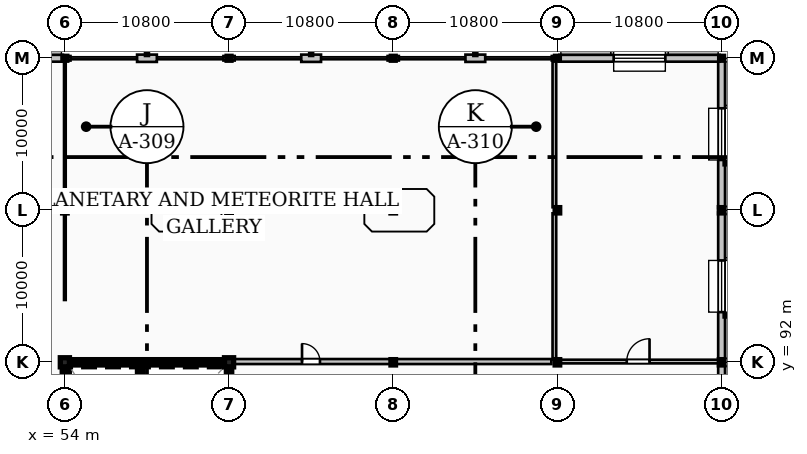
"""IFC4 building model, lengths in metres.
Left out: names, types, materials, properties, quantities, classifications, styles, units other than length and angle.
Written with IfcOpenShell. Run it as: python <this file> out.ifc"""

import sys

from ifc_helpers import new_model, si_unit, direction, frame, frame_2d, origin, origin_2d, place, context, subcontext, project, spatial, rectangle, hollow_rectangle, i_section, extrude, element, fill, save


model = new_model("IFC4")
c1 = context("Model", 3, precision=1e-05, world=origin(), true_north=direction((0.0, 1.0)))
c2 = subcontext(c1, "Body", "Model", "MODEL_VIEW")
j1 = project(units=[si_unit("LENGTHUNIT", "METRE"), si_unit("PLANEANGLEUNIT", "RADIAN")], contexts=[c1])
p1 = place(None, origin())
s1 = spatial("IfcSite", under=j1, at=p1, CompositionType="ELEMENT")
p2 = place(p1, origin())
s2 = spatial("IfcBuilding", under=s1, at=p2, CompositionType="ELEMENT")
p3 = place(p2, frame((0.0, 0.0, 14.4)))
s3 = spatial("IfcBuildingStorey", under=s2, at=p3, CompositionType="ELEMENT", Elevation=14.4)
p4 = place(p3, frame((54.0, 92.0, 0.0), z_axis=(0.0, 0.0, 1.0), x_axis=(1.0, 0.0, 0.0)))
e1 = element("IfcColumn", 1, at=p4, inside=s3, PredefinedType="COLUMN", context=c2, shape_type="SweptSolid", body=[
    extrude(rectangle(XDim=0.6, YDim=0.6, at=origin_2d()), origin(), (0.0, 0.0, 1.0), 9.6),
])
p5 = place(p3, frame((54.0, 102.0, 0.0), z_axis=(0.0, 0.0, 1.0), x_axis=(1.0, 0.0, 0.0)))
e2 = element("IfcColumn", 2, at=p5, inside=s3, PredefinedType="COLUMN", context=c2, shape_type="SweptSolid", body=[
    extrude(i_section(OverallWidth=0.3, OverallDepth=0.35, WebThickness=0.01, FlangeThickness=0.018, FilletRadius=0.027, at=origin_2d()), origin(), (0.0, 0.0, 1.0), 9.6),
])
p6 = place(p3, frame((54.0, 112.0, 0.0), z_axis=(0.0, 0.0, 1.0), x_axis=(1.0, 0.0, 0.0)))
e3 = element("IfcColumn", 3, at=p6, inside=s3, PredefinedType="COLUMN", context=c2, shape_type="SweptSolid", body=[
    extrude(hollow_rectangle(XDim=0.26, YDim=0.26, WallThickness=0.014, InnerFilletRadius=0.014, OuterFilletRadius=0.028, at=origin_2d()), origin(), (0.0, 0.0, 1.0), 9.6),
])
p7 = place(p3, frame((64.8, 92.0, 0.0), z_axis=(0.0, 0.0, 1.0), x_axis=(1.0, 0.0, 0.0)))
e4 = element("IfcColumn", 4, at=p7, inside=s3, PredefinedType="COLUMN", context=c2, shape_type="SweptSolid", body=[
    extrude(rectangle(XDim=0.6, YDim=0.6, at=origin_2d()), origin(), (0.0, 0.0, 1.0), 9.6),
])
p8 = place(p3, frame((64.8, 102.0, 0.0), z_axis=(0.0, 0.0, 1.0), x_axis=(1.0, 0.0, 0.0)))
e5 = element("IfcColumn", 5, at=p8, inside=s3, PredefinedType="COLUMN", context=c2, shape_type="SweptSolid", body=[
    extrude(i_section(OverallWidth=0.3, OverallDepth=0.35, WebThickness=0.01, FlangeThickness=0.018, FilletRadius=0.027, at=origin_2d()), origin(), (0.0, 0.0, 1.0), 9.6),
])
p9 = place(p3, frame((64.8, 112.0, 0.0), z_axis=(0.0, 0.0, 1.0), x_axis=(1.0, 0.0, 0.0)))
e6 = element("IfcColumn", 6, at=p9, inside=s3, PredefinedType="COLUMN", context=c2, shape_type="SweptSolid", body=[
    extrude(hollow_rectangle(XDim=0.26, YDim=0.26, WallThickness=0.014, InnerFilletRadius=0.014, OuterFilletRadius=0.028, at=origin_2d()), origin(), (0.0, 0.0, 1.0), 9.6),
])
for number, where, z_axis, x_axis in (
    (7, (75.6, 92.0, 0.0), (0.0, 0.0, 1.0), (1.0, 0.0, 0.0)),
    (8, (75.6, 102.0, 0.0), (0.0, 0.0, 1.0), (1.0, 0.0, 0.0)),
):
    element("IfcColumn", number, at=place(p3, frame(where, z_axis=z_axis, x_axis=x_axis)), inside=s3, PredefinedType="COLUMN", context=c2, shape_type="SweptSolid", body=[
        extrude(i_section(OverallWidth=0.3, OverallDepth=0.35, WebThickness=0.01, FlangeThickness=0.018, FilletRadius=0.027, at=origin_2d()), origin(), (0.0, 0.0, 1.0), 9.6),
    ])
p10 = place(p3, frame((75.6, 112.0, 0.0), z_axis=(0.0, 0.0, 1.0), x_axis=(1.0, 0.0, 0.0)))
e9 = element("IfcColumn", 9, at=p10, inside=s3, PredefinedType="COLUMN", context=c2, shape_type="SweptSolid", body=[
    extrude(hollow_rectangle(XDim=0.26, YDim=0.26, WallThickness=0.014, InnerFilletRadius=0.014, OuterFilletRadius=0.028, at=origin_2d()), origin(), (0.0, 0.0, 1.0), 9.6),
])
for number, where, z_axis, x_axis in (
    (10, (86.4, 92.0, 0.0), (0.0, 0.0, 1.0), (1.0, 0.0, 0.0)),
    (11, (86.4, 102.0, 0.0), (0.0, 0.0, 1.0), (1.0, 0.0, 0.0)),
):
    element("IfcColumn", number, at=place(p3, frame(where, z_axis=z_axis, x_axis=x_axis)), inside=s3, PredefinedType="COLUMN", context=c2, shape_type="SweptSolid", body=[
        extrude(i_section(OverallWidth=0.3, OverallDepth=0.35, WebThickness=0.01, FlangeThickness=0.018, FilletRadius=0.027, at=origin_2d()), origin(), (0.0, 0.0, 1.0), 9.6),
    ])
p11 = place(p3, frame((86.4, 112.0, 0.0), z_axis=(0.0, 0.0, 1.0), x_axis=(1.0, 0.0, 0.0)))
e12 = element("IfcColumn", 12, at=p11, inside=s3, PredefinedType="COLUMN", context=c2, shape_type="SweptSolid", body=[
    extrude(hollow_rectangle(XDim=0.26, YDim=0.26, WallThickness=0.014, InnerFilletRadius=0.014, OuterFilletRadius=0.028, at=origin_2d()), origin(), (0.0, 0.0, 1.0), 9.6),
])
for number, where, z_axis, x_axis in (
    (13, (97.2, 92.0, 0.0), (0.0, 0.0, 1.0), (1.0, 0.0, 0.0)),
    (14, (97.2, 102.0, 0.0), (0.0, 0.0, 1.0), (1.0, 0.0, 0.0)),
):
    element("IfcColumn", number, at=place(p3, frame(where, z_axis=z_axis, x_axis=x_axis)), inside=s3, PredefinedType="COLUMN", context=c2, shape_type="SweptSolid", body=[
        extrude(i_section(OverallWidth=0.3, OverallDepth=0.35, WebThickness=0.01, FlangeThickness=0.018, FilletRadius=0.027, at=origin_2d()), origin(), (0.0, 0.0, 1.0), 9.6),
    ])
p12 = place(p3, frame((97.2, 112.0, 0.0), z_axis=(0.0, 0.0, 1.0), x_axis=(1.0, 0.0, 0.0)))
e15 = element("IfcColumn", 15, at=p12, inside=s3, PredefinedType="COLUMN", context=c2, shape_type="SweptSolid", body=[
    extrude(hollow_rectangle(XDim=0.26, YDim=0.26, WallThickness=0.014, InnerFilletRadius=0.014, OuterFilletRadius=0.028, at=origin_2d()), origin(), (0.0, 0.0, 1.0), 9.6),
])
p13 = place(p3, frame((97.2, 82.145, 0.0), z_axis=(0.0, 0.0, 1.0), x_axis=(0.0, 1.0, 0.0)))
e16 = element("IfcWall", 16, at=p13, inside=s3, PredefinedType="STANDARD", context=c2, shape_type="SweptSolid", body=[
    extrude(rectangle(XDim=9.71, YDim=0.45, at=frame_2d((4.855, 0.0))), origin(), (0.0, 0.0, 1.0), 9.36),
])
p14 = place(p13, frame((3.155, 0.0, 1.1)))
e17 = element("IfcOpeningElement", 17, at=p14, cuts=e16, PredefinedType="OPENING", context=c2, shape_type="SweptSolid", body=[
    extrude(rectangle(XDim=3.4, YDim=5.8, at=frame_2d((1.7, 2.9))), frame((0.0, 0.235, 0.0), z_axis=(0.0, -1.0, 0.0), x_axis=(1.0, 0.0, 0.0)), (0.0, 0.0, 1.0), 0.47),
])
p15 = place(p3, frame((97.2, 92.145, 0.0), z_axis=(0.0, 0.0, 1.0), x_axis=(0.0, 1.0, 0.0)))
e18 = element("IfcWall", 18, at=p15, inside=s3, PredefinedType="STANDARD", context=c2, shape_type="SweptSolid", body=[
    extrude(rectangle(XDim=9.71, YDim=0.45, at=frame_2d((4.855, 0.0))), origin(), (0.0, 0.0, 1.0), 9.36),
])
p16 = place(p15, frame((3.155, 0.0, 1.1)))
e19 = element("IfcOpeningElement", 19, at=p16, cuts=e18, PredefinedType="OPENING", context=c2, shape_type="SweptSolid", body=[
    extrude(rectangle(XDim=3.4, YDim=5.8, at=frame_2d((1.7, 2.9))), frame((0.0, 0.235, 0.0), z_axis=(0.0, -1.0, 0.0), x_axis=(1.0, 0.0, 0.0)), (0.0, 0.0, 1.0), 0.47),
])
p17 = place(p3, frame((97.2, 102.145, 0.0), z_axis=(0.0, 0.0, 1.0), x_axis=(0.0, 1.0, 0.0)))
e20 = element("IfcWall", 20, at=p17, inside=s3, PredefinedType="STANDARD", context=c2, shape_type="SweptSolid", body=[
    extrude(rectangle(XDim=9.729, YDim=0.45, at=frame_2d((4.865, 0.0))), origin(), (0.0, 0.0, 1.0), 9.36),
])
p18 = place(p17, frame((3.165, 0.0, 1.1)))
e21 = element("IfcOpeningElement", 21, at=p18, cuts=e20, PredefinedType="OPENING", context=c2, shape_type="SweptSolid", body=[
    extrude(rectangle(XDim=3.4, YDim=5.8, at=frame_2d((1.7, 2.9))), frame((0.0, 0.235, 0.0), z_axis=(0.0, -1.0, 0.0), x_axis=(1.0, 0.0, 0.0)), (0.0, 0.0, 1.0), 0.47),
])
p19 = place(p3, frame((97.074, 112.0, 0.0), z_axis=(0.0, 0.0, 1.0), x_axis=(-1.0, 0.0, 0.0)))
e22 = element("IfcWall", 22, at=p19, inside=s3, PredefinedType="STANDARD", context=c2, shape_type="SweptSolid", body=[
    extrude(rectangle(XDim=10.548, YDim=0.45, at=frame_2d((5.274, 0.0))), origin(), (0.0, 0.0, 1.0), 8.91),
])
p20 = place(p19, frame((3.574, 0.0, 1.1)))
e23 = element("IfcOpeningElement", 23, at=p20, cuts=e22, PredefinedType="OPENING", context=c2, shape_type="SweptSolid", body=[
    extrude(rectangle(XDim=3.4, YDim=5.8, at=frame_2d((1.7, 2.9))), frame((0.0, 0.235, 0.0), z_axis=(0.0, -1.0, 0.0), x_axis=(1.0, 0.0, 0.0)), (0.0, 0.0, 1.0), 0.47),
])
p21 = place(p3, frame((81.65, 112.0, 0.0), z_axis=(0.0, 0.0, 1.0), x_axis=(-1.0, 0.0, 0.0)))
e24 = element("IfcWall", 24, at=p21, inside=s3, PredefinedType="STANDARD", context=c2, shape_type="SweptSolid", body=[
    extrude(rectangle(XDim=1.3, YDim=0.48, at=frame_2d((0.65, 0.0))), origin(), (0.0, 0.0, 1.0), 8.92),
])
for number, where, z_axis, x_axis in (
    (25, (86.274, 112.0, 0.0), (0.0, 0.0, 1.0), (-1.0, 0.0, 0.0)),
    (26, (75.97, 112.0, 0.0), (0.0, 0.0, 1.0), (-1.0, 0.0, 0.0)),
):
    element("IfcWall", number, at=place(p3, frame(where, z_axis=z_axis, x_axis=x_axis)), inside=s3, PredefinedType="STANDARD", context=c2, shape_type="SweptSolid", body=[
        extrude(rectangle(XDim=0.244, YDim=0.3, at=frame_2d((0.122, 0.0))), origin(), (0.0, 0.0, 1.0), 9.36),
    ])
p22 = place(p3, frame((70.85, 112.0, 0.0), z_axis=(0.0, 0.0, 1.0), x_axis=(-1.0, 0.0, 0.0)))
e27 = element("IfcWall", 27, at=p22, inside=s3, PredefinedType="STANDARD", context=c2, shape_type="SweptSolid", body=[
    extrude(rectangle(XDim=1.3, YDim=0.48, at=frame_2d((0.65, 0.0))), origin(), (0.0, 0.0, 1.0), 8.92),
])
p23 = place(p3, frame((75.474, 112.0, 0.0), z_axis=(0.0, 0.0, 1.0), x_axis=(-1.0, 0.0, 0.0)))
e28 = element("IfcWall", 28, at=p23, inside=s3, PredefinedType="STANDARD", context=c2, shape_type="SweptSolid", body=[
    extrude(rectangle(XDim=0.244, YDim=0.3, at=frame_2d((0.122, 0.0))), origin(), (0.0, 0.0, 1.0), 9.36),
])
p24 = place(p3, frame((65.17, 112.0, 0.0), z_axis=(0.0, 0.0, 1.0), x_axis=(-1.0, 0.0, 0.0)))
e29 = element("IfcWall", 29, at=p24, inside=s3, PredefinedType="STANDARD", context=c2, shape_type="SweptSolid", body=[
    extrude(rectangle(XDim=0.244, YDim=0.3, at=frame_2d((0.122, 0.0))), origin(), (0.0, 0.0, 1.0), 9.36),
])
p25 = place(p3, frame((60.05, 112.0, 0.0), z_axis=(0.0, 0.0, 1.0), x_axis=(-1.0, 0.0, 0.0)))
e30 = element("IfcWall", 30, at=p25, inside=s3, PredefinedType="STANDARD", context=c2, shape_type="SweptSolid", body=[
    extrude(rectangle(XDim=1.3, YDim=0.48, at=frame_2d((0.65, 0.0))), origin(), (0.0, 0.0, 1.0), 8.92),
])
for number, where, z_axis, x_axis in (
    (31, (64.674, 112.0, 0.0), (0.0, 0.0, 1.0), (-1.0, 0.0, 0.0)),
    (32, (54.37, 112.0, 0.0), (0.0, 0.0, 1.0), (-1.0, 0.0, 0.0)),
):
    element("IfcWall", number, at=place(p3, frame(where, z_axis=z_axis, x_axis=x_axis)), inside=s3, PredefinedType="STANDARD", context=c2, shape_type="SweptSolid", body=[
        extrude(rectangle(XDim=0.244, YDim=0.3, at=frame_2d((0.122, 0.0))), origin(), (0.0, 0.0, 1.0), 9.36),
    ])
p26 = place(p3, frame((53.874, 112.0, 0.0), z_axis=(0.0, 0.0, 1.0), x_axis=(-1.0, 0.0, 0.0)))
e33 = element("IfcWall", 33, at=p26, inside=s3, PredefinedType="STANDARD", context=c2, shape_type="SweptSolid", body=[
    extrude(rectangle(XDim=10.548, YDim=0.45, at=frame_2d((5.274, 0.0))), origin(), (0.0, 0.0, 1.0), 8.92),
])
p27 = place(p26, frame((3.574, 0.0, 1.1)))
e34 = element("IfcOpeningElement", 34, at=p27, cuts=e33, PredefinedType="OPENING", context=c2, shape_type="SweptSolid", body=[
    extrude(rectangle(XDim=3.4, YDim=5.8, at=frame_2d((1.7, 2.9))), frame((0.0, 0.235, 0.0), z_axis=(0.0, -1.0, 0.0), x_axis=(1.0, 0.0, 0.0)), (0.0, 0.0, 1.0), 0.47),
])
p28 = place(p3, frame((54.3, 92.0, 0.0), z_axis=(0.0, 0.0, 1.0), x_axis=(1.0, 0.0, 0.0)))
e35 = element("IfcWall", 35, at=p28, inside=s3, PredefinedType="SHEAR", context=c2, shape_type="SweptSolid", body=[
    extrude(rectangle(XDim=10.2, YDim=0.35, at=frame_2d((5.1, 0.0))), origin(), (0.0, 0.0, 1.0), 9.36),
])
p29 = place(p3, frame((54.0, 82.3, 0.0), z_axis=(0.0, 0.0, 1.0), x_axis=(0.0, 1.0, 0.0)))
e36 = element("IfcWall", 36, at=p29, inside=s3, PredefinedType="SHEAR", context=c2, shape_type="SweptSolid", body=[
    extrude(rectangle(XDim=9.4, YDim=0.35, at=frame_2d((4.7, 0.0))), origin(), (0.0, 0.0, 1.0), 9.36),
])
p30 = place(p3, frame((64.8, 82.3, 0.0), z_axis=(0.0, 0.0, 1.0), x_axis=(0.0, 1.0, 0.0)))
e37 = element("IfcWall", 37, at=p30, inside=s3, PredefinedType="SHEAR", context=c2, shape_type="SweptSolid", body=[
    extrude(rectangle(XDim=9.4, YDim=0.35, at=frame_2d((4.7, 0.0))), origin(), (0.0, 0.0, 1.0), 9.36),
])
p31 = place(p30, frame((0.88, 0.0, 0.0)))
e38 = element("IfcOpeningElement", 38, at=p31, cuts=e37, PredefinedType="OPENING", context=c2, shape_type="SweptSolid", body=[
    extrude(rectangle(XDim=1.8, YDim=2.25, at=frame_2d((0.9, 1.125))), frame((0.0, 0.185, 0.0), z_axis=(0.0, -1.0, 0.0), x_axis=(1.0, 0.0, 0.0)), (0.0, 0.0, 1.0), 0.37),
])
p32 = place(p3, frame((58.95, 82.175, 0.0), z_axis=(0.0, 0.0, 1.0), x_axis=(0.0, 1.0, 0.0)))
e39 = element("IfcWall", 39, at=p32, inside=s3, PredefinedType="SHEAR", context=c2, shape_type="SweptSolid", body=[
    extrude(rectangle(XDim=9.65, YDim=0.35, at=frame_2d((4.825, 0.0))), origin(), (0.0, 0.0, 1.0), 9.36),
])
p33 = place(p32, frame((0.9, 0.0, 0.0)))
e40 = element("IfcOpeningElement", 40, at=p33, cuts=e39, PredefinedType="OPENING", context=c2, shape_type="SweptSolid", body=[
    extrude(rectangle(XDim=1.1, YDim=2.2, at=frame_2d((0.55, 1.1))), frame((0.0, 0.185, 0.0), z_axis=(0.0, -1.0, 0.0), x_axis=(1.0, 0.0, 0.0)), (0.0, 0.0, 1.0), 0.37),
])
p34 = place(p3, frame((64.98, 92.05, 0.0), z_axis=(0.0, 0.0, 1.0), x_axis=(1.0, 0.0, 0.0)))
e41 = element("IfcWall", 41, at=p34, inside=s3, PredefinedType="PARTITIONING", context=c2, shape_type="SweptSolid", body=[
    extrude(rectangle(XDim=10.42, YDim=0.33, at=frame_2d((5.21, 0.0))), origin(), (0.0, 0.0, 1.0), 8.92),
])
p35 = place(p34, frame((4.62, 0.0, 0.0)))
e42 = element("IfcOpeningElement", 42, at=p35, cuts=e41, PredefinedType="OPENING", context=c2, shape_type="SweptSolid", body=[
    extrude(rectangle(XDim=1.18, YDim=2.28, at=frame_2d((0.59, 1.14))), frame((0.0, 0.175, 0.0), z_axis=(0.0, -1.0, 0.0), x_axis=(1.0, 0.0, 0.0)), (0.0, 0.0, 1.0), 0.35),
])
p36 = place(p3, frame((75.8, 92.05, 0.0), z_axis=(0.0, 0.0, 1.0), x_axis=(1.0, 0.0, 0.0)))
e43 = element("IfcWall", 43, at=p36, inside=s3, PredefinedType="PARTITIONING", context=c2, shape_type="SweptSolid", body=[
    extrude(rectangle(XDim=10.2, YDim=0.33, at=frame_2d((5.1, 0.0))), origin(), (0.0, 0.0, 1.0), 8.92),
])
p37 = place(p3, frame((86.4, 92.05, 0.0), z_axis=(0.0, 0.0, 1.0), x_axis=(1.0, 0.0, 0.0)))
e44 = element("IfcWall", 44, at=p37, inside=s3, PredefinedType="SOLIDWALL", context=c2, shape_type="SweptSolid", body=[
    extrude(rectangle(XDim=10.62, YDim=0.24, at=frame_2d((5.31, 0.0))), origin(), (0.0, 0.0, 1.0), 8.91),
])
p38 = place(p37, frame((4.56, 0.0, 0.0)))
e45 = element("IfcOpeningElement", 45, at=p38, cuts=e44, PredefinedType="OPENING", context=c2, shape_type="SweptSolid", body=[
    extrude(rectangle(XDim=1.5, YDim=2.3, at=frame_2d((0.75, 1.15))), frame((0.0, 0.13, 0.0), z_axis=(0.0, -1.0, 0.0), x_axis=(1.0, 0.0, 0.0)), (0.0, 0.0, 1.0), 0.26),
])
p39 = place(p3, frame((54.0, 96.1, 0.0), z_axis=(0.0, 0.0, 1.0), x_axis=(0.0, 1.0, 0.0)))
e46 = element("IfcWall", 46, at=p39, inside=s3, PredefinedType="PARTITIONING", context=c2, shape_type="SweptSolid", body=[
    extrude(rectangle(XDim=5.7, YDim=0.11, at=frame_2d((2.85, 0.0))), origin(), (0.0, 0.0, 1.0), 8.86),
])
p40 = place(p3, frame((54.0, 102.2, 0.0), z_axis=(0.0, 0.0, 1.0), x_axis=(0.0, 1.0, 0.0)))
e47 = element("IfcWall", 47, at=p40, inside=s3, PredefinedType="PARTITIONING", context=c2, shape_type="SweptSolid", body=[
    extrude(rectangle(XDim=9.62, YDim=0.11, at=frame_2d((4.81, 0.0))), origin(), (0.0, 0.0, 1.0), 8.86),
])
for number, where, z_axis, x_axis in (
    (48, (86.2, 92.18, 0.0), (0.0, 0.0, 1.0), (0.0, 1.0, 0.0)),
    (49, (86.2, 102.2, 0.0), (0.0, 0.0, 1.0), (0.0, 1.0, 0.0)),
):
    element("IfcWall", number, at=place(p3, frame(where, z_axis=z_axis, x_axis=x_axis)), inside=s3, PredefinedType="SOLIDWALL", context=c2, shape_type="SweptSolid", body=[
        extrude(rectangle(XDim=9.62, YDim=0.24, at=frame_2d((4.81, 0.0))), origin(), (0.0, 0.0, 1.0), 9.32),
    ])
p41 = place(p16, origin())
e50 = element("IfcWindow", 50, at=p41, inside=s3, PartitioningType="SINGLE_PANEL", PredefinedType="WINDOW", context=c2, shape_type="SweptSolid", body=[
    extrude(rectangle(XDim=3.4, YDim=5.8, at=frame_2d((1.7, 2.9))), frame((0.0, 0.03, 0.0), z_axis=(0.0, -1.0, 0.0), x_axis=(1.0, 0.0, 0.0)), (0.0, 0.0, 1.0), 0.06),
])
fill(e19, e50)
p42 = place(p18, origin())
e51 = element("IfcWindow", 51, at=p42, inside=s3, PartitioningType="SINGLE_PANEL", PredefinedType="WINDOW", context=c2, shape_type="SweptSolid", body=[
    extrude(rectangle(XDim=3.4, YDim=5.8, at=frame_2d((1.7, 2.9))), frame((0.0, 0.03, 0.0), z_axis=(0.0, -1.0, 0.0), x_axis=(1.0, 0.0, 0.0)), (0.0, 0.0, 1.0), 0.06),
])
fill(e21, e51)
p43 = place(p20, origin())
e52 = element("IfcWindow", 52, at=p43, inside=s3, PartitioningType="SINGLE_PANEL", PredefinedType="WINDOW", context=c2, shape_type="SweptSolid", body=[
    extrude(rectangle(XDim=3.4, YDim=5.8, at=frame_2d((1.7, 2.9))), frame((0.0, 0.03, 0.0), z_axis=(0.0, -1.0, 0.0), x_axis=(1.0, 0.0, 0.0)), (0.0, 0.0, 1.0), 0.06),
])
fill(e23, e52)
p44 = place(p35, origin())
e53 = element("IfcDoor", 53, at=p44, inside=s3, OperationType="SINGLE_SWING_LEFT", PredefinedType="DOOR", context=c2, shape_type="SweptSolid", body=[
    extrude(rectangle(XDim=1.18, YDim=2.28, at=frame_2d((0.59, 1.14))), frame((0.0, 0.025, 0.0), z_axis=(0.0, -1.0, 0.0), x_axis=(1.0, 0.0, 0.0)), (0.0, 0.0, 1.0), 0.05),
])
fill(e42, e53)
p45 = place(p38, origin())
e54 = element("IfcDoor", 54, at=p45, inside=s3, OperationType="SINGLE_SWING_RIGHT", PredefinedType="DOOR", context=c2, shape_type="SweptSolid", body=[
    extrude(rectangle(XDim=1.5, YDim=2.3, at=frame_2d((0.75, 1.15))), frame((0.0, 0.025, 0.0), z_axis=(0.0, -1.0, 0.0), x_axis=(1.0, 0.0, 0.0)), (0.0, 0.0, 1.0), 0.05),
])
fill(e45, e54)
save(model, sys.argv[1])
